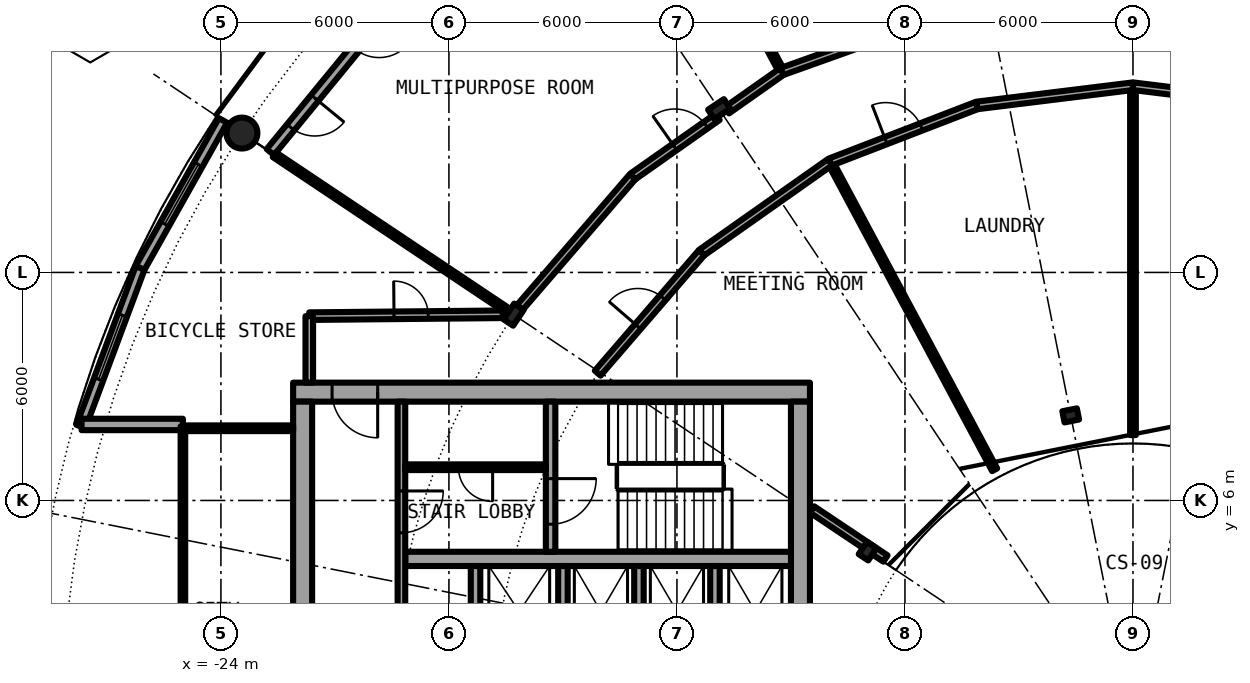
"""IFC4 building model, lengths in metres.
Left out: names, types, materials, properties, quantities, classifications, styles, units other than length and angle.
Written with IfcOpenShell. Run it as: python <this file> out.ifc"""

import sys

from ifc_helpers import new_model, si_unit, direction, frame, frame_2d, origin, origin_2d, place, context, subcontext, project, spatial, rectangle, hollow_circle, i_section, extrude, element, fill, save


model = new_model("IFC4")
c1 = context("Model", 3, precision=1e-05, world=origin(), true_north=direction((0.0, 1.0)))
c2 = subcontext(c1, "Body", "Model", "MODEL_VIEW")
j1 = project(units=[si_unit("LENGTHUNIT", "METRE"), si_unit("PLANEANGLEUNIT", "RADIAN")], contexts=[c1])
p1 = place(None, origin())
s1 = spatial("IfcSite", under=j1, at=p1, CompositionType="ELEMENT")
p2 = place(p1, origin())
s2 = spatial("IfcBuilding", under=s1, at=p2, CompositionType="ELEMENT")
p3 = place(p2, frame((0.0, 0.0, 157.4)))
s3 = spatial("IfcBuildingStorey", under=s2, at=p3, CompositionType="ELEMENT", Elevation=157.4)
p4 = place(p3, frame((-23.448, 15.667, 0.0), z_axis=(0.0, 0.0, 1.0), x_axis=(1.0, 0.0, 0.0)))
e1 = element("IfcColumn", 1, at=p4, inside=s3, PredefinedType="COLUMN", context=c2, shape_type="SweptSolid", body=[
    extrude(hollow_circle(Radius=0.406, WallThickness=0.04, at=origin_2d()), origin(), (0.0, 0.0, 1.0), 4.2),
])
for number, where, z_axis, x_axis in (
    (2, (-10.889, 16.297, 0.0), (0.0, 0.0, 1.0), (-0.556, 0.831, 0.0)),
    (3, (-16.297, 10.889, 0.0), (0.0, 0.0, 1.0), (-0.831, 0.556, 0.0)),
):
    element("IfcColumn", number, at=place(p3, frame(where, z_axis=z_axis, x_axis=x_axis)), inside=s3, PredefinedType="COLUMN", context=c2, shape_type="SweptSolid", body=[
        extrude(i_section(OverallWidth=0.3, OverallDepth=0.5, WebThickness=0.014, FlangeThickness=0.028, FilletRadius=0.027, at=origin_2d()), origin(), (0.0, 0.0, 1.0), 4.2),
    ])
for number, where, z_axis, x_axis in (
    (4, (-1.639, 8.239, 0.0), (0.0, 0.0, 1.0), (-0.195, 0.981, 0.0)),
    (5, (-6.984, 4.667, 0.0), (0.0, 0.0, 1.0), (-0.831, 0.556, 0.0)),
):
    element("IfcColumn", number, at=place(p3, frame(where, z_axis=z_axis, x_axis=x_axis)), inside=s3, PredefinedType="COLUMN", context=c2, shape_type="SweptSolid", body=[
        extrude(i_section(OverallWidth=0.3, OverallDepth=0.39, WebThickness=0.011, FlangeThickness=0.019, FilletRadius=0.027, at=origin_2d()), origin(), (0.0, 0.0, 1.0), 4.2),
    ])
p5 = place(p3, frame((-19.304, 19.304, 0.0), z_axis=(0.0, 0.0, 1.0), x_axis=(-0.634382322723, -0.773019449054, 0.0)))
e6 = element("IfcWall", 6, at=p5, inside=s3, PredefinedType="SOLIDWALL", context=c2, shape_type="SweptSolid", body=[
    extrude(rectangle(XDim=5.352, YDim=0.25, at=frame_2d((2.676, 0.0))), origin(), (0.0, 0.0, 1.0), 3.85),
])
p6 = place(p5, frame((0.841, 0.0, 0.0)))
e7 = element("IfcOpeningElement", 7, at=p6, cuts=e6, PredefinedType="OPENING", context=c2, shape_type="SweptSolid", body=[
    extrude(rectangle(XDim=1.0, YDim=2.2, at=frame_2d((0.5, 1.1))), frame((0.0, 0.135, 0.0), z_axis=(0.0, -1.0, 0.0), x_axis=(1.0, 0.0, 0.0)), (0.0, 0.0, 1.0), 0.27),
])
p7 = place(p5, frame((3.51, 0.0, 0.0)))
e8 = element("IfcOpeningElement", 8, at=p7, cuts=e6, PredefinedType="OPENING", context=c2, shape_type="SweptSolid", body=[
    extrude(rectangle(XDim=1.0, YDim=2.2, at=frame_2d((0.5, 1.1))), frame((0.0, 0.135, 0.0), z_axis=(0.0, -1.0, 0.0), x_axis=(1.0, 0.0, 0.0)), (0.0, 0.0, 1.0), 0.27),
])
p8 = place(p3, frame((-23.946, 16.0, 0.0), z_axis=(0.0, 0.0, 1.0), x_axis=(-0.489696356642, -0.871893042919, 0.0)))
e9 = element("IfcWall", 9, at=p8, inside=s3, PredefinedType="SOLIDWALL", context=c2, shape_type="SweptSolid", body=[
    extrude(rectangle(XDim=4.454, YDim=0.25, at=frame_2d((2.227, 0.0))), origin(), (0.0, 0.0, 1.0), 3.85),
])
p9 = place(p8, frame((1.327, 0.0, 0.3)))
e10 = element("IfcOpeningElement", 10, at=p9, cuts=e9, PredefinedType="OPENING", context=c2, shape_type="SweptSolid", body=[
    extrude(rectangle(XDim=1.8, YDim=2.1, at=frame_2d((0.9, 1.05))), frame((0.0, 0.135, 0.0), z_axis=(0.0, -1.0, 0.0), x_axis=(1.0, 0.0, 0.0)), (0.0, 0.0, 1.0), 0.27),
])
p10 = place(p3, frame((-26.127, 12.117, 0.0), z_axis=(0.0, 0.0, 1.0), x_axis=(-0.349247811493, -0.937030397675, 0.0)))
e11 = element("IfcWall", 11, at=p10, inside=s3, PredefinedType="SOLIDWALL", context=c2, shape_type="SweptSolid", body=[
    extrude(rectangle(XDim=4.452, YDim=0.25, at=frame_2d((2.226, 0.0))), origin(), (0.0, 0.0, 1.0), 3.85),
])
p11 = place(p10, frame((1.327, 0.0, 0.3)))
e12 = element("IfcOpeningElement", 12, at=p11, cuts=e11, PredefinedType="OPENING", context=c2, shape_type="SweptSolid", body=[
    extrude(rectangle(XDim=1.8, YDim=2.1, at=frame_2d((0.9, 1.05))), frame((0.0, 0.135, 0.0), z_axis=(0.0, -1.0, 0.0), x_axis=(1.0, 0.0, 0.0)), (0.0, 0.0, 1.0), 0.27),
])
p12 = place(p3, frame((-25.0, 8.0, 0.0), z_axis=(0.0, 0.0, 1.0), x_axis=(-1.0, 0.0, 0.0)))
e13 = element("IfcWall", 13, at=p12, inside=s3, PredefinedType="SOLIDWALL", context=c2, shape_type="SweptSolid", body=[
    extrude(rectangle(XDim=2.667, YDim=0.3, at=frame_2d((1.333, 0.0))), origin(), (0.0, 0.0, 1.0), 3.85),
])
p13 = place(p3, frame((-8.5, 8.85, 0.0), z_axis=(0.0, 0.0, 1.0), x_axis=(-1.0, 0.0, 0.0)))
e14 = element("IfcWall", 14, at=p13, inside=s3, PredefinedType="SHEAR", context=c2, shape_type="SweptSolid", body=[
    extrude(rectangle(XDim=13.6, YDim=0.5, at=frame_2d((6.8, 0.0))), origin(), (0.0, 0.0, 1.0), 4.2),
])
p14 = place(p13, frame((11.375, 0.0, 0.0)))
e15 = element("IfcOpeningElement", 15, at=p14, cuts=e14, PredefinedType="OPENING", context=c2, shape_type="SweptSolid", body=[
    extrude(rectangle(XDim=1.2, YDim=2.3, at=frame_2d((0.6, 1.15))), frame((0.0, 0.26, 0.0), z_axis=(0.0, -1.0, 0.0), x_axis=(1.0, 0.0, 0.0)), (0.0, 0.0, 1.0), 0.52),
])
p15 = place(p3, frame((-21.85, -8.6, 0.0), z_axis=(0.0, 0.0, 1.0), x_axis=(0.0, 1.0, 0.0)))
e16 = element("IfcWall", 16, at=p15, inside=s3, PredefinedType="SHEAR", context=c2, shape_type="SweptSolid", body=[
    extrude(rectangle(XDim=17.2, YDim=0.5, at=frame_2d((8.6, 0.0))), origin(), (0.0, 0.0, 1.0), 4.2),
])
p16 = place(p15, frame((7.7, 0.0, 0.0)))
e17 = element("IfcOpeningElement", 17, at=p16, cuts=e16, PredefinedType="OPENING", context=c2, shape_type="SweptSolid", body=[
    extrude(rectangle(XDim=1.8, YDim=2.3, at=frame_2d((0.9, 1.15))), frame((0.0, 0.26, 0.0), z_axis=(0.0, -1.0, 0.0), x_axis=(1.0, 0.0, 0.0)), (0.0, 0.0, 1.0), 0.52),
])
p17 = place(p3, frame((-8.75, 8.6, 0.0), z_axis=(0.0, 0.0, 1.0), x_axis=(0.0, -1.0, 0.0)))
e18 = element("IfcWall", 18, at=p17, inside=s3, PredefinedType="SHEAR", context=c2, shape_type="SweptSolid", body=[
    extrude(rectangle(XDim=17.2, YDim=0.5, at=frame_2d((8.6, 0.0))), origin(), (0.0, 0.0, 1.0), 4.2),
])
p18 = place(p17, frame((7.4, 0.0, 0.1)))
e19 = element("IfcOpeningElement", 19, at=p18, cuts=e18, PredefinedType="OPENING", context=c2, shape_type="SweptSolid", body=[
    extrude(rectangle(XDim=2.4, YDim=2.2, at=frame_2d((1.2, 1.1))), frame((0.0, 0.26, 0.0), z_axis=(0.0, -1.0, 0.0), x_axis=(1.0, 0.0, 0.0)), (0.0, 0.0, 1.0), 0.52),
])
p19 = place(p3, frame((-9.0, 4.462, 0.0), z_axis=(0.0, 0.0, 1.0), x_axis=(-1.0, 0.0, 0.0)))
e20 = element("IfcWall", 20, at=p19, inside=s3, PredefinedType="SHEAR", context=c2, shape_type="SweptSolid", body=[
    extrude(rectangle(XDim=10.15, YDim=0.375, at=frame_2d((5.075, 0.0))), origin(), (0.0, 0.0, 1.0), 4.2),
])
p20 = place(p3, frame((-15.325, 8.6, 0.0), z_axis=(0.0, 0.0, 1.0), x_axis=(0.0, -1.0, 0.0)))
e21 = element("IfcWall", 21, at=p20, inside=s3, PredefinedType="SHEAR", context=c2, shape_type="SweptSolid", body=[
    extrude(rectangle(XDim=3.95, YDim=0.25, at=frame_2d((1.975, 0.0))), origin(), (0.0, 0.0, 1.0), 4.2),
])
p21 = place(p20, frame((2.025, 0.0, 0.0)))
e22 = element("IfcOpeningElement", 22, at=p21, cuts=e21, PredefinedType="OPENING", context=c2, shape_type="SweptSolid", body=[
    extrude(rectangle(XDim=1.2, YDim=2.3, at=frame_2d((0.6, 1.15))), frame((0.0, 0.135, 0.0), z_axis=(0.0, -1.0, 0.0), x_axis=(1.0, 0.0, 0.0)), (0.0, 0.0, 1.0), 0.27),
])
for number, where, z_axis, x_axis in (
    (23, (-15.0, 1.825, 0.0), (0.0, 0.0, 1.0), (0.0, 1.0, 0.0)),
    (24, (-17.3, 1.825, 0.0), (0.0, 0.0, 1.0), (0.0, 1.0, 0.0)),
):
    element("IfcWall", number, at=place(p3, frame(where, z_axis=z_axis, x_axis=x_axis)), inside=s3, PredefinedType="SOLIDWALL", context=c2, shape_type="SweptSolid", body=[
        extrude(rectangle(XDim=2.45, YDim=0.25, at=frame_2d((1.225, 0.0))), origin(), (0.0, 0.0, 1.0), 3.85),
    ])
p22 = place(p3, frame((-19.25, 8.6, 0.0), z_axis=(0.0, 0.0, 1.0), x_axis=(0.0, -1.0, 0.0)))
e25 = element("IfcWall", 25, at=p22, inside=s3, PredefinedType="SOLIDWALL", context=c2, shape_type="SweptSolid", body=[
    extrude(rectangle(XDim=7.025, YDim=0.2, at=frame_2d((3.513, 0.0))), origin(), (0.0, 0.0, 1.0), 3.85),
])
p23 = place(p22, frame((2.35, 0.0, 0.0)))
e26 = element("IfcOpeningElement", 26, at=p23, cuts=e25, PredefinedType="OPENING", context=c2, shape_type="SweptSolid", body=[
    extrude(rectangle(XDim=1.1, YDim=2.3, at=frame_2d((0.55, 1.15))), frame((0.0, 0.11, 0.0), z_axis=(0.0, -1.0, 0.0), x_axis=(1.0, 0.0, 0.0)), (0.0, 0.0, 1.0), 0.22),
])
for number, where, z_axis, x_axis in (
    (27, (-11.0, 1.825, 0.0), (0.0, 0.0, 1.0), (0.0, 1.0, 0.0)),
    (28, (-13.0, 1.825, 0.0), (0.0, 0.0, 1.0), (0.0, 1.0, 0.0)),
):
    element("IfcWall", number, at=place(p3, frame(where, z_axis=z_axis, x_axis=x_axis)), inside=s3, PredefinedType="SOLIDWALL", context=c2, shape_type="SweptSolid", body=[
        extrude(rectangle(XDim=2.45, YDim=0.25, at=frame_2d((1.225, 0.0))), origin(), (0.0, 0.0, 1.0), 3.85),
    ])
p24 = place(p3, frame((-15.45, 6.875, 0.0), z_axis=(0.0, 0.0, 1.0), x_axis=(-1.0, 0.0, 0.0)))
e29 = element("IfcWall", 29, at=p24, inside=s3, PredefinedType="PARTITIONING", context=c2, shape_type="SweptSolid", body=[
    extrude(rectangle(XDim=3.7, YDim=0.15, at=frame_2d((1.85, 0.0))), origin(), (0.0, 0.0, 1.0), 3.85),
])
p25 = place(p24, frame((1.4, 0.0, 0.0)))
e30 = element("IfcOpeningElement", 30, at=p25, cuts=e29, PredefinedType="OPENING", context=c2, shape_type="SweptSolid", body=[
    extrude(rectangle(XDim=0.9, YDim=2.3, at=frame_2d((0.45, 1.15))), frame((0.0, 0.085, 0.0), z_axis=(0.0, -1.0, 0.0), x_axis=(1.0, 0.0, 0.0)), (0.0, 0.0, 1.0), 0.17),
])
p26 = place(p3, frame((-22.1, 7.9, 0.0), z_axis=(0.0, 0.0, 1.0), x_axis=(-1.0, 0.0, 0.0)))
e31 = element("IfcWall", 31, at=p26, inside=s3, PredefinedType="PARTITIONING", context=c2, shape_type="SweptSolid", body=[
    extrude(rectangle(XDim=2.84, YDim=0.15, at=frame_2d((1.42, 0.0))), origin(), (0.0, 0.0, 1.0), 3.85),
])
p27 = place(p3, frame((-25.0, 7.95, 0.0), z_axis=(0.0, 0.0, 1.0), x_axis=(0.0, -1.0, 0.0)))
e32 = element("IfcWall", 32, at=p27, inside=s3, PredefinedType="PARTITIONING", context=c2, shape_type="SweptSolid", body=[
    extrude(rectangle(XDim=15.9, YDim=0.12, at=frame_2d((7.95, 0.0))), origin(), (0.0, 0.0, 1.0), 3.85),
])
p28 = place(p27, frame((0.95, 0.0, 0.1)))
e33 = element("IfcOpeningElement", 33, at=p28, cuts=e32, PredefinedType="OPENING", context=c2, shape_type="SweptSolid", body=[
    extrude(rectangle(XDim=14.0, YDim=3.5, at=frame_2d((7.0, 1.75))), frame((0.0, 0.07, 0.0), z_axis=(0.0, -1.0, 0.0), x_axis=(1.0, 0.0, 0.0)), (0.0, 0.0, 1.0), 0.14),
])
p29 = place(p3, frame((-22.595, 15.098, 0.0), z_axis=(0.0, 0.0, 1.0), x_axis=(0.831434446288, -0.555622859075, 0.0)))
e34 = element("IfcWall", 34, at=p29, inside=s3, PredefinedType="PARTITIONING", context=c2, shape_type="SweptSolid", body=[
    extrude(rectangle(XDim=7.325, YDim=0.15, at=frame_2d((3.662, 0.0))), origin(), (0.0, 0.0, 1.0), 3.85),
])
p30 = place(p3, frame((-12.812, 23.965, 0.0), z_axis=(0.0, 0.0, 1.0), x_axis=(0.471439510802, -0.881898399848, 0.0)))
e35 = element("IfcWall", 35, at=p30, inside=s3, PredefinedType="PARTITIONING", context=c2, shape_type="SweptSolid", body=[
    extrude(rectangle(XDim=7.575, YDim=0.15, at=frame_2d((3.787, 0.0))), origin(), (0.0, 0.0, 1.0), 3.85),
])
p31 = place(p3, frame((-7.968, 14.904, 0.0), z_axis=(0.0, 0.0, 1.0), x_axis=(0.471460365694, -0.881887251059, 0.0)))
e36 = element("IfcWall", 36, at=p31, inside=s3, PredefinedType="PARTITIONING", context=c2, shape_type="SweptSolid", body=[
    extrude(rectangle(XDim=9.18, YDim=0.15, at=frame_2d((4.59, 0.0))), origin(), (0.0, 0.0, 1.0), 3.85),
])
p32 = place(p3, frame((0.0, 7.72, 0.0), z_axis=(0.0, 0.0, 1.0), x_axis=(0.0, 1.0, 0.0)))
e37 = element("IfcWall", 37, at=p32, inside=s3, PredefinedType="PARTITIONING", context=c2, shape_type="SweptSolid", body=[
    extrude(rectangle(XDim=9.18, YDim=0.15, at=frame_2d((4.59, 0.0))), origin(), (0.0, 0.0, 1.0), 3.85),
])
p33 = place(p3, frame((-6.513, 4.472, 0.0), z_axis=(0.0, 0.0, 1.0), x_axis=(-0.83133816625, 0.555766905579, 0.0)))
e38 = element("IfcWall", 38, at=p33, inside=s3, PredefinedType="PARTITIONING", context=c2, shape_type="SweptSolid", body=[
    extrude(rectangle(XDim=2.323, YDim=0.2, at=frame_2d((1.162, 0.0))), origin(), (0.0, 0.0, 1.0), 3.85),
])
p34 = place(p3, frame((-21.675, 10.85, 0.0), z_axis=(0.0, 0.0, 1.0), x_axis=(0.999954045313, 0.009586827528, 0.0)))
e39 = element("IfcWall", 39, at=p34, inside=s3, PredefinedType="PARTITIONING", context=c2, shape_type="SweptSolid", body=[
    extrude(rectangle(XDim=5.093, YDim=0.2, at=frame_2d((2.547, 0.0))), origin(), (0.0, 0.0, 1.0), 3.85),
])
p35 = place(p34, frame((2.23, 0.0, 0.0)))
e40 = element("IfcOpeningElement", 40, at=p35, cuts=e39, PredefinedType="OPENING", context=c2, shape_type="SweptSolid", body=[
    extrude(rectangle(XDim=0.9, YDim=2.3, at=frame_2d((0.45, 1.15))), frame((0.0, 0.11, 0.0), z_axis=(0.0, -1.0, 0.0), x_axis=(1.0, 0.0, 0.0)), (0.0, 0.0, 1.0), 0.22),
])
p36 = place(p3, frame((-14.086, 9.35, 0.0), z_axis=(0.0, 0.0, 1.0), x_axis=(0.653273870261, 0.757121687996, 0.0)))
e41 = element("IfcWall", 41, at=p36, inside=s3, PredefinedType="PARTITIONING", context=c2, shape_type="SweptSolid", body=[
    extrude(rectangle(XDim=4.189, YDim=0.2, at=frame_2d((2.095, 0.0))), origin(), (0.0, 0.0, 1.0), 3.85),
])
p37 = place(p36, frame((1.621, 0.0, 0.0)))
e42 = element("IfcOpeningElement", 42, at=p37, cuts=e41, PredefinedType="OPENING", context=c2, shape_type="SweptSolid", body=[
    extrude(rectangle(XDim=1.0, YDim=2.3, at=frame_2d((0.5, 1.15))), frame((0.0, 0.11, 0.0), z_axis=(0.0, -1.0, 0.0), x_axis=(1.0, 0.0, 0.0)), (0.0, 0.0, 1.0), 0.22),
])
p38 = place(p3, frame((-11.349, 12.522, 0.0), z_axis=(0.0, 0.0, 1.0), x_axis=(0.817567680547, 0.575832517079, 0.0)))
e43 = element("IfcWall", 43, at=p38, inside=s3, PredefinedType="PARTITIONING", context=c2, shape_type="SweptSolid", body=[
    extrude(rectangle(XDim=4.137, YDim=0.2, at=frame_2d((2.068, 0.0))), origin(), (0.0, 0.0, 1.0), 3.85),
])
p39 = place(p3, frame((-7.967, 14.904, 0.0), z_axis=(0.0, 0.0, 1.0), x_axis=(0.932943640288, 0.360022449363, 0.0)))
e44 = element("IfcWall", 44, at=p39, inside=s3, PredefinedType="PARTITIONING", context=c2, shape_type="SweptSolid", body=[
    extrude(rectangle(XDim=4.139, YDim=0.2, at=frame_2d((2.069, 0.0))), origin(), (0.0, 0.0, 1.0), 3.85),
])
p40 = place(p39, frame((1.569, 0.0, 0.0)))
e45 = element("IfcOpeningElement", 45, at=p40, cuts=e44, PredefinedType="OPENING", context=c2, shape_type="SweptSolid", body=[
    extrude(rectangle(XDim=1.0, YDim=2.3, at=frame_2d((0.5, 1.15))), frame((0.0, 0.11, 0.0), z_axis=(0.0, -1.0, 0.0), x_axis=(1.0, 0.0, 0.0)), (0.0, 0.0, 1.0), 0.22),
])
for number, where, z_axis, x_axis in (
    (46, (-4.106, 16.394, 0.0), (0.0, 0.0, 1.0), (0.992, 0.122, 0.0)),
    (47, (0.0, 16.9, 0.0), (0.0, 0.0, 1.0), (0.992, -0.122, 0.0)),
):
    element("IfcWall", number, at=place(p3, frame(where, z_axis=z_axis, x_axis=x_axis)), inside=s3, PredefinedType="PARTITIONING", context=c2, shape_type="SweptSolid", body=[
        extrude(rectangle(XDim=4.137, YDim=0.2, at=frame_2d((2.068, 0.0))), origin(), (0.0, 0.0, 1.0), 3.85),
    ])
p41 = place(p3, frame((-9.239, 17.286, 0.0), z_axis=(0.0, 0.0, 1.0), x_axis=(0.941550382061, 0.336872198379, 0.0)))
e48 = element("IfcWall", 48, at=p41, inside=s3, PredefinedType="PARTITIONING", context=c2, shape_type="SweptSolid", body=[
    extrude(rectangle(XDim=5.599, YDim=0.2, at=frame_2d((2.8, 0.0))), origin(), (0.0, 0.0, 1.0), 3.54),
])
p42 = place(p3, frame((-16.198, 11.004, 0.0), z_axis=(0.0, 0.0, 1.0), x_axis=(0.653094461639, 0.757276451619, 0.0)))
e49 = element("IfcWall", 49, at=p42, inside=s3, PredefinedType="PARTITIONING", context=c2, shape_type="SweptSolid", body=[
    extrude(rectangle(XDim=4.647, YDim=0.2, at=frame_2d((2.323, 0.0))), origin(), (0.0, 0.0, 1.0), 3.54),
])
p43 = place(p3, frame((-13.163, 14.523, 0.0), z_axis=(0.0, 0.0, 1.0), x_axis=(0.817664396292, 0.57569517545, 0.0)))
e50 = element("IfcWall", 50, at=p43, inside=s3, PredefinedType="PARTITIONING", context=c2, shape_type="SweptSolid", body=[
    extrude(rectangle(XDim=2.727, YDim=0.2, at=frame_2d((1.364, 0.0))), origin(), (0.0, 0.0, 1.0), 3.54),
])
p44 = place(p43, frame((1.35, 0.0, 0.0)))
e51 = element("IfcOpeningElement", 51, at=p44, cuts=e50, PredefinedType="OPENING", context=c2, shape_type="SweptSolid", body=[
    extrude(rectangle(XDim=1.0, YDim=2.3, at=frame_2d((0.5, 1.15))), frame((0.0, 0.11, 0.0), z_axis=(0.0, -1.0, 0.0), x_axis=(1.0, 0.0, 0.0)), (0.0, 0.0, 1.0), 0.22),
])
p45 = place(p3, frame((-10.688, 16.266, 0.0), z_axis=(0.0, 0.0, 1.0), x_axis=(0.817772792535, 0.575541188613, 0.0)))
e52 = element("IfcWall", 52, at=p45, inside=s3, PredefinedType="PARTITIONING", context=c2, shape_type="SweptSolid", body=[
    extrude(rectangle(XDim=1.772, YDim=0.2, at=frame_2d((0.886, 0.0))), origin(), (0.0, 0.0, 1.0), 3.54),
])
p46 = place(p3, frame((-21.675, 9.1, 0.0), z_axis=(0.0, 0.0, 1.0), x_axis=(0.0, 1.0, 0.0)))
e53 = element("IfcWall", 53, at=p46, inside=s3, PredefinedType="PARTITIONING", context=c2, shape_type="SweptSolid", body=[
    extrude(rectangle(XDim=1.75, YDim=0.2, at=frame_2d((0.875, 0.0))), origin(), (0.0, 0.0, 1.0), 3.85),
])
p47 = place(p7, origin())
e54 = element("IfcDoor", 54, at=p47, inside=s3, OperationType="SINGLE_SWING_LEFT", PredefinedType="DOOR", context=c2, shape_type="SweptSolid", body=[
    extrude(rectangle(XDim=1.0, YDim=2.2, at=frame_2d((0.5, 1.1))), frame((0.0, 0.025, 0.0), z_axis=(0.0, -1.0, 0.0), x_axis=(1.0, 0.0, 0.0)), (0.0, 0.0, 1.0), 0.05),
])
fill(e8, e54)
p48 = place(p9, origin())
e55 = element("IfcWindow", 55, at=p48, inside=s3, PartitioningType="SINGLE_PANEL", PredefinedType="WINDOW", context=c2, shape_type="SweptSolid", body=[
    extrude(rectangle(XDim=1.8, YDim=2.1, at=frame_2d((0.9, 1.05))), frame((0.0, 0.03, 0.0), z_axis=(0.0, -1.0, 0.0), x_axis=(1.0, 0.0, 0.0)), (0.0, 0.0, 1.0), 0.06),
])
fill(e10, e55)
p49 = place(p11, origin())
e56 = element("IfcWindow", 56, at=p49, inside=s3, PartitioningType="SINGLE_PANEL", PredefinedType="WINDOW", context=c2, shape_type="SweptSolid", body=[
    extrude(rectangle(XDim=1.8, YDim=2.1, at=frame_2d((0.9, 1.05))), frame((0.0, 0.03, 0.0), z_axis=(0.0, -1.0, 0.0), x_axis=(1.0, 0.0, 0.0)), (0.0, 0.0, 1.0), 0.06),
])
fill(e12, e56)
p50 = place(p25, origin())
e57 = element("IfcDoor", 57, at=p50, inside=s3, OperationType="SINGLE_SWING_LEFT", PredefinedType="DOOR", context=c2, shape_type="SweptSolid", body=[
    extrude(rectangle(XDim=0.9, YDim=2.3, at=frame_2d((0.45, 1.15))), frame((0.0, 0.025, 0.0), z_axis=(0.0, -1.0, 0.0), x_axis=(1.0, 0.0, 0.0)), (0.0, 0.0, 1.0), 0.05),
])
fill(e30, e57)
p51 = place(p21, origin())
e58 = element("IfcDoor", 58, at=p51, inside=s3, OperationType="SINGLE_SWING_LEFT", PredefinedType="DOOR", context=c2, shape_type="SweptSolid", body=[
    extrude(rectangle(XDim=1.2, YDim=2.3, at=frame_2d((0.6, 1.15))), frame((0.0, 0.025, 0.0), z_axis=(0.0, -1.0, 0.0), x_axis=(1.0, 0.0, 0.0)), (0.0, 0.0, 1.0), 0.05),
])
fill(e22, e58)
p52 = place(p23, origin())
e59 = element("IfcDoor", 59, at=p52, inside=s3, OperationType="SINGLE_SWING_RIGHT", PredefinedType="DOOR", context=c2, shape_type="SweptSolid", body=[
    extrude(rectangle(XDim=1.1, YDim=2.3, at=frame_2d((0.55, 1.15))), frame((0.0, 0.025, 0.0), z_axis=(0.0, -1.0, 0.0), x_axis=(1.0, 0.0, 0.0)), (0.0, 0.0, 1.0), 0.05),
])
fill(e26, e59)
p53 = place(p14, origin())
e60 = element("IfcDoor", 60, at=p53, inside=s3, OperationType="SINGLE_SWING_LEFT", PredefinedType="DOOR", context=c2, shape_type="SweptSolid", body=[
    extrude(rectangle(XDim=1.2, YDim=2.3, at=frame_2d((0.6, 1.15))), frame((0.0, 0.025, 0.0), z_axis=(0.0, -1.0, 0.0), x_axis=(1.0, 0.0, 0.0)), (0.0, 0.0, 1.0), 0.05),
])
fill(e15, e60)
p54 = place(p28, origin())
e61 = element("IfcWindow", 61, at=p54, inside=s3, PartitioningType="SINGLE_PANEL", PredefinedType="WINDOW", context=c2, shape_type="SweptSolid", body=[
    extrude(rectangle(XDim=14.0, YDim=3.5, at=frame_2d((7.0, 1.75))), frame((0.0, 0.03, 0.0), z_axis=(0.0, -1.0, 0.0), x_axis=(1.0, 0.0, 0.0)), (0.0, 0.0, 1.0), 0.06),
])
fill(e33, e61)
p55 = place(p44, origin())
e62 = element("IfcDoor", 62, at=p55, inside=s3, OperationType="SINGLE_SWING_RIGHT", PredefinedType="DOOR", context=c2, shape_type="SweptSolid", body=[
    extrude(rectangle(XDim=1.0, YDim=2.3, at=frame_2d((0.5, 1.15))), frame((0.0, 0.025, 0.0), z_axis=(0.0, -1.0, 0.0), x_axis=(1.0, 0.0, 0.0)), (0.0, 0.0, 1.0), 0.05),
])
fill(e51, e62)
p56 = place(p40, origin())
e63 = element("IfcDoor", 63, at=p56, inside=s3, OperationType="SINGLE_SWING_RIGHT", PredefinedType="DOOR", context=c2, shape_type="SweptSolid", body=[
    extrude(rectangle(XDim=1.0, YDim=2.3, at=frame_2d((0.5, 1.15))), frame((0.0, 0.025, 0.0), z_axis=(0.0, -1.0, 0.0), x_axis=(1.0, 0.0, 0.0)), (0.0, 0.0, 1.0), 0.05),
])
fill(e45, e63)
p57 = place(p37, origin())
e64 = element("IfcDoor", 64, at=p57, inside=s3, OperationType="SINGLE_SWING_RIGHT", PredefinedType="DOOR", context=c2, shape_type="SweptSolid", body=[
    extrude(rectangle(XDim=1.0, YDim=2.3, at=frame_2d((0.5, 1.15))), frame((0.0, 0.025, 0.0), z_axis=(0.0, -1.0, 0.0), x_axis=(1.0, 0.0, 0.0)), (0.0, 0.0, 1.0), 0.05),
])
fill(e42, e64)
p58 = place(p35, origin())
e65 = element("IfcDoor", 65, at=p58, inside=s3, OperationType="SINGLE_SWING_RIGHT", PredefinedType="DOOR", context=c2, shape_type="SweptSolid", body=[
    extrude(rectangle(XDim=0.9, YDim=2.3, at=frame_2d((0.45, 1.15))), frame((0.0, 0.025, 0.0), z_axis=(0.0, -1.0, 0.0), x_axis=(1.0, 0.0, 0.0)), (0.0, 0.0, 1.0), 0.05),
])
fill(e40, e65)
save(model, sys.argv[1])
